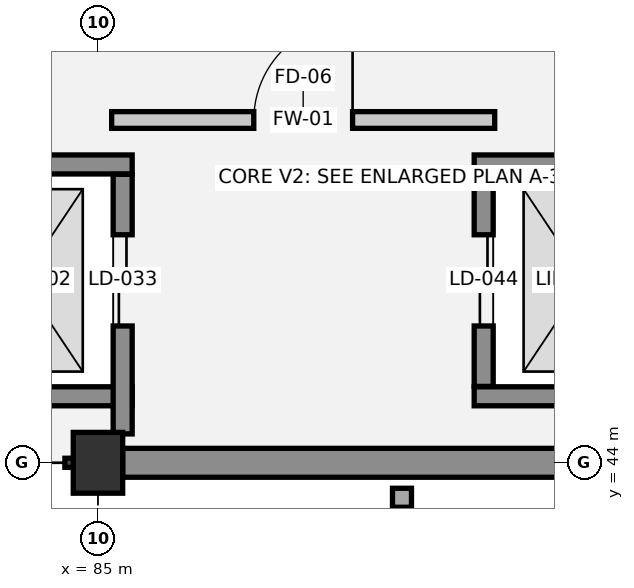
"""IFC4 building model, lengths in metres.
Left out: names, types, materials, properties, quantities, classifications, styles, units other than length and angle.
Written with IfcOpenShell. Run it as: python <this file> out.ifc"""

import sys

from ifc_helpers import new_model, si_unit, direction, frame, frame_2d, origin, origin_2d, place, context, subcontext, project, spatial, rectangle, extrude, element, fill, save


model = new_model("IFC4")
c1 = context("Model", 3, precision=1e-05, world=origin(), true_north=direction((0.0, 1.0)))
c2 = subcontext(c1, "Body", "Model", "MODEL_VIEW")
j1 = project(units=[si_unit("LENGTHUNIT", "METRE"), si_unit("PLANEANGLEUNIT", "RADIAN")], contexts=[c1])
p1 = place(None, origin())
s1 = spatial("IfcSite", under=j1, at=p1, CompositionType="ELEMENT")
p2 = place(p1, origin())
s2 = spatial("IfcBuilding", under=s1, at=p2, CompositionType="ELEMENT")
p3 = place(p2, frame((0.0, 0.0, 18.3)))
s3 = spatial("IfcBuildingStorey", under=s2, at=p3, CompositionType="ELEMENT", Elevation=18.3)
p4 = place(p3, frame((85.0, 44.0, 0.0), z_axis=(0.0, 0.0, 1.0), x_axis=(1.0, 0.0, 0.0)))
e1 = element("IfcColumn", 1, at=p4, inside=s3, PredefinedType="COLUMN", context=c2, shape_type="SweptSolid", body=[
    extrude(rectangle(XDim=0.65, YDim=0.8, at=origin_2d()), origin(), (0.0, 0.0, 1.0), 3.75),
])
p5 = place(p3, frame((92.675, 44.0, 0.0), z_axis=(0.0, 0.0, 1.0), x_axis=(-1.0, 0.0, 0.0)))
e2 = element("IfcWall", 2, at=p5, inside=s3, PredefinedType="STANDARD", context=c2, shape_type="SweptSolid", body=[
    extrude(rectangle(XDim=7.35, YDim=0.38, at=frame_2d((3.675, 0.0))), origin(), (0.0, 0.0, 1.0), 2.6),
])
for number, where, z_axis, x_axis in (
    (3, (82.55, 44.875, 0.0), (0.0, 0.0, 1.0), (1.0, 0.0, 0.0)),
    (4, (85.45, 47.925, 0.0), (0.0, 0.0, 1.0), (-1.0, 0.0, 0.0)),
):
    element("IfcWall", number, at=place(p3, frame(where, z_axis=z_axis, x_axis=x_axis)), inside=s3, PredefinedType="SHEAR", context=c2, shape_type="SweptSolid", body=[
        extrude(rectangle(XDim=2.9, YDim=0.25, at=frame_2d((1.45, 0.0))), origin(), (0.0, 0.0, 1.0), 3.75),
    ])
p6 = place(p3, frame((85.325, 44.38, 0.0), z_axis=(0.0, 0.0, 1.0), x_axis=(0.0, 1.0, 0.0)))
e5 = element("IfcWall", 5, at=p6, inside=s3, PredefinedType="SHEAR", context=c2, shape_type="SweptSolid", body=[
    extrude(rectangle(XDim=3.415, YDim=0.25, at=frame_2d((1.708, 0.0))), origin(), (0.0, 0.0, 1.0), 3.75),
])
p7 = place(p6, frame((1.42, 0.0, 0.0)))
e6 = element("IfcOpeningElement", 6, at=p7, cuts=e5, PredefinedType="OPENING", context=c2, shape_type="SweptSolid", body=[
    extrude(rectangle(XDim=1.2, YDim=2.2, at=frame_2d((0.6, 1.1))), frame((0.0, 0.135, 0.0), z_axis=(0.0, -1.0, 0.0), x_axis=(1.0, 0.0, 0.0)), (0.0, 0.0, 1.0), 0.27),
])
for number, where, z_axis, x_axis in (
    (7, (89.95, 44.875, 0.0), (0.0, 0.0, 1.0), (1.0, 0.0, 0.0)),
    (8, (92.85, 47.925, 0.0), (0.0, 0.0, 1.0), (-1.0, 0.0, 0.0)),
):
    element("IfcWall", number, at=place(p3, frame(where, z_axis=z_axis, x_axis=x_axis)), inside=s3, PredefinedType="SHEAR", context=c2, shape_type="SweptSolid", body=[
        extrude(rectangle(XDim=2.9, YDim=0.25, at=frame_2d((1.45, 0.0))), origin(), (0.0, 0.0, 1.0), 3.75),
    ])
p8 = place(p3, frame((90.075, 47.795, 0.0), z_axis=(0.0, 0.0, 1.0), x_axis=(0.0, -1.0, 0.0)))
e9 = element("IfcWall", 9, at=p8, inside=s3, PredefinedType="SHEAR", context=c2, shape_type="SweptSolid", body=[
    extrude(rectangle(XDim=2.79, YDim=0.25, at=frame_2d((1.395, 0.0))), origin(), (0.0, 0.0, 1.0), 3.75),
])
p9 = place(p8, frame((0.795, 0.0, 0.0)))
e10 = element("IfcOpeningElement", 10, at=p9, cuts=e9, PredefinedType="OPENING", context=c2, shape_type="SweptSolid", body=[
    extrude(rectangle(XDim=1.2, YDim=2.2, at=frame_2d((0.6, 1.1))), frame((0.0, 0.135, 0.0), z_axis=(0.0, -1.0, 0.0), x_axis=(1.0, 0.0, 0.0)), (0.0, 0.0, 1.0), 0.27),
])
p10 = place(p3, frame((85.18, 48.51, 0.0), z_axis=(0.0, 0.0, 1.0), x_axis=(1.0, 0.0, 0.0)))
e11 = element("IfcWall", 11, at=p10, inside=s3, PredefinedType="SOLIDWALL", context=c2, shape_type="SweptSolid", body=[
    extrude(rectangle(XDim=5.04, YDim=0.22, at=frame_2d((2.52, 0.0))), origin(), (0.0, 0.0, 1.0), 3.47),
])
p11 = place(p10, frame((1.87, 0.0, 0.0)))
e12 = element("IfcOpeningElement", 12, at=p11, cuts=e11, PredefinedType="OPENING", context=c2, shape_type="SweptSolid", body=[
    extrude(rectangle(XDim=1.3, YDim=2.15, at=frame_2d((0.65, 1.075))), frame((0.0, 0.12, 0.0), z_axis=(0.0, -1.0, 0.0), x_axis=(1.0, 0.0, 0.0)), (0.0, 0.0, 1.0), 0.24),
])
p12 = place(p7, origin())
e13 = element("IfcDoor", 13, at=p12, inside=s3, OperationType="DOUBLE_DOOR_SLIDING", PredefinedType="DOOR", context=c2, shape_type="SweptSolid", body=[
    extrude(rectangle(XDim=1.2, YDim=2.2, at=frame_2d((0.6, 1.1))), frame((0.0, 0.025, 0.0), z_axis=(0.0, -1.0, 0.0), x_axis=(1.0, 0.0, 0.0)), (0.0, 0.0, 1.0), 0.05),
])
fill(e6, e13)
p13 = place(p9, origin())
e14 = element("IfcDoor", 14, at=p13, inside=s3, OperationType="DOUBLE_DOOR_SLIDING", PredefinedType="DOOR", context=c2, shape_type="SweptSolid", body=[
    extrude(rectangle(XDim=1.2, YDim=2.2, at=frame_2d((0.6, 1.1))), frame((0.0, 0.025, 0.0), z_axis=(0.0, -1.0, 0.0), x_axis=(1.0, 0.0, 0.0)), (0.0, 0.0, 1.0), 0.05),
])
fill(e10, e14)
p14 = place(p11, origin())
e15 = element("IfcDoor", 15, at=p14, inside=s3, OperationType="SINGLE_SWING_RIGHT", PredefinedType="DOOR", context=c2, shape_type="SweptSolid", body=[
    extrude(rectangle(XDim=1.3, YDim=2.15, at=frame_2d((0.65, 1.075))), frame((0.0, 0.025, 0.0), z_axis=(0.0, -1.0, 0.0), x_axis=(1.0, 0.0, 0.0)), (0.0, 0.0, 1.0), 0.05),
])
fill(e12, e15)
save(model, sys.argv[1])
